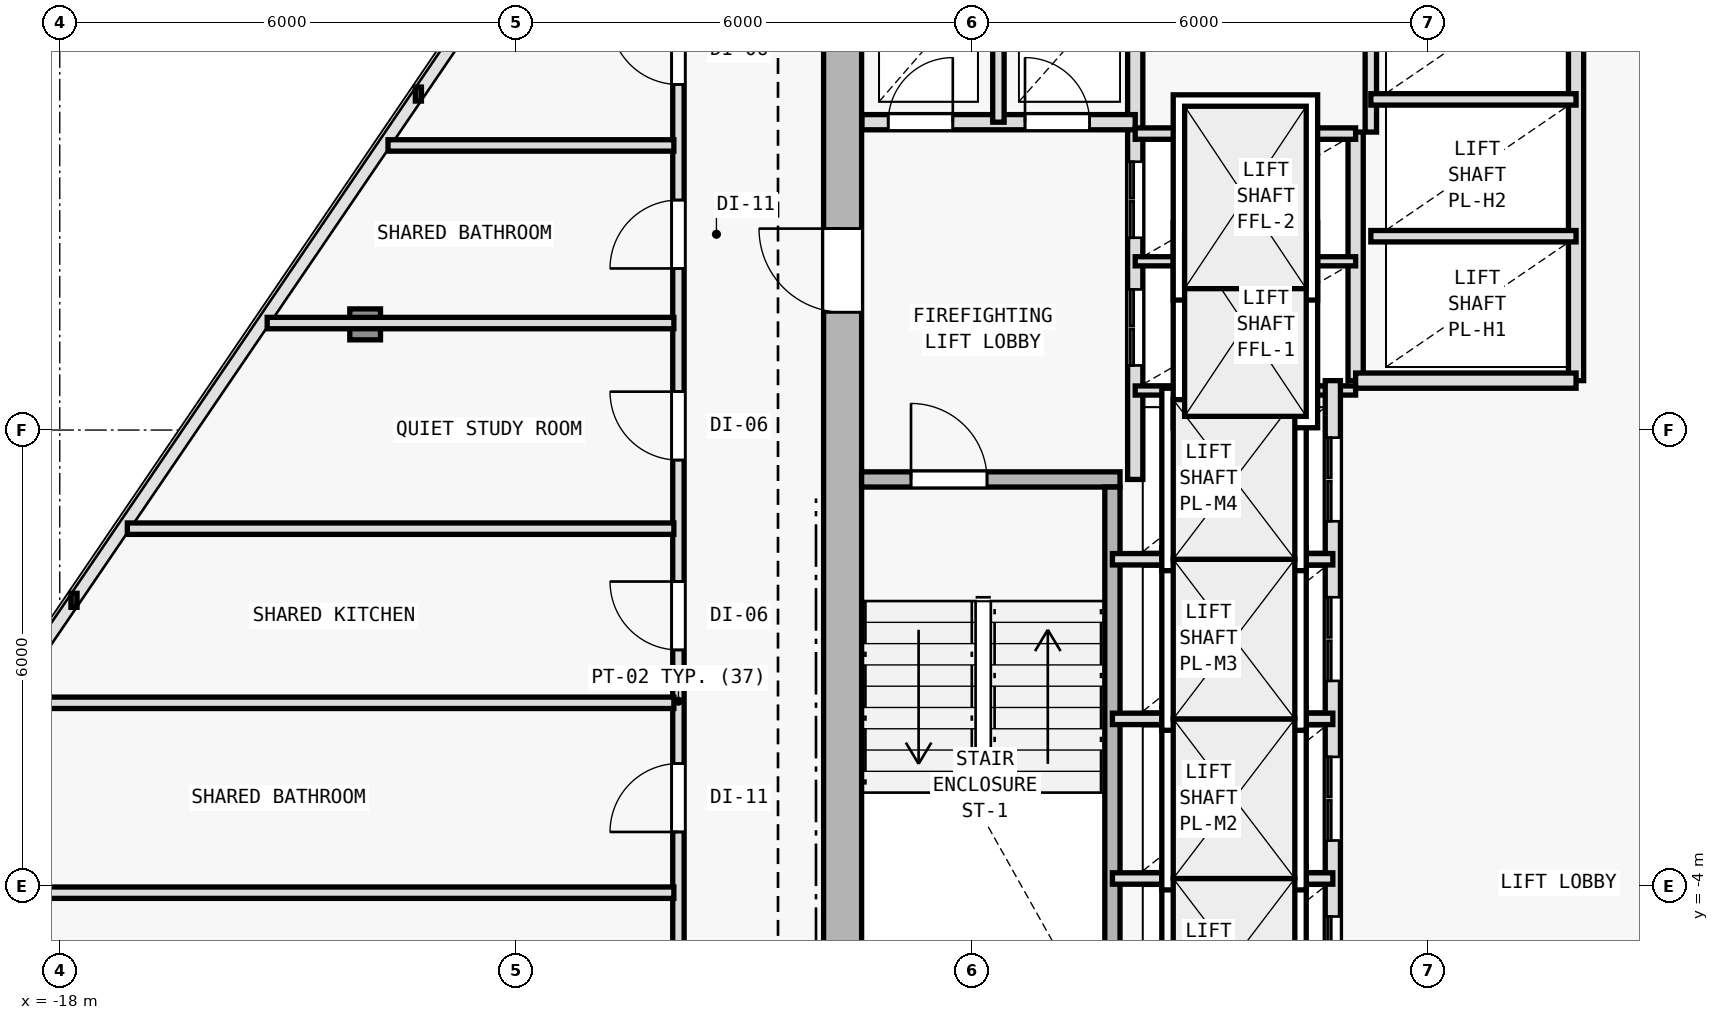
"""IFC4 building model, lengths in metres.
Left out: names, types, materials, properties, quantities, classifications, styles, units other than length and angle.
Written with IfcOpenShell. Run it as: python <this file> out.ifc"""

import sys

from ifc_helpers import new_model, si_unit, direction, frame, frame_2d, origin, origin_2d, place, context, subcontext, project, spatial, rectangle, i_section, extrude, element, fill, save


model = new_model("IFC4")
c1 = context("Model", 3, precision=1e-05, world=origin(), true_north=direction((0.0, 1.0)))
c2 = subcontext(c1, "Body", "Model", "MODEL_VIEW")
j1 = project(units=[si_unit("LENGTHUNIT", "METRE"), si_unit("PLANEANGLEUNIT", "RADIAN")], contexts=[c1])
p1 = place(None, origin())
s1 = spatial("IfcSite", under=j1, at=p1, CompositionType="ELEMENT")
p2 = place(p1, origin())
s2 = spatial("IfcBuilding", under=s1, at=p2, CompositionType="ELEMENT")
p3 = place(p2, frame((0.0, 0.0, 160.2)))
s3 = spatial("IfcBuildingStorey", under=s2, at=p3, CompositionType="ELEMENT", Elevation=160.2)
p4 = place(p3, frame((-7.7, 2.0, 0.0), z_axis=(0.0, 0.0, 1.0), x_axis=(1.0, 0.0, 0.0)))
e1 = element("IfcColumn", 1, at=p4, inside=s3, PredefinedType="COLUMN", context=c2, shape_type="SweptSolid", body=[
    extrude(i_section(OverallWidth=0.404, OverallDepth=0.407, WebThickness=0.017, FlangeThickness=0.028, FilletRadius=0.015, at=origin_2d()), origin(), (0.0, 0.0, 1.0), 3.6),
])
p5 = place(p3, frame((-13.982, 3.39, 0.006), z_axis=(0.017003561856, 0.009590008887, 0.99980943715), x_axis=(-0.491253415567, 0.871016694268, 0.0)))
e2 = element("IfcColumn", 2, at=p5, inside=s3, PredefinedType="COLUMN", context=c2, shape_type="SweptSolid", body=[
    extrude(i_section(OverallWidth=0.404, OverallDepth=0.407, WebThickness=0.017, FlangeThickness=0.028, FilletRadius=0.015, at=origin_2d()), origin(), (0.0, 0.0, 1.0), 3.59),
])
p6 = place(p3, frame((-7.7, -9.15, 0.0), z_axis=(0.0, 0.0, 1.0), x_axis=(0.0, 1.0, 0.0)))
e3 = element("IfcWall", 3, at=p6, inside=s3, PredefinedType="SHEAR", context=c2, shape_type="SweptSolid", body=[
    extrude(rectangle(XDim=19.1, YDim=0.5, at=frame_2d((9.55, 0.0))), origin(), (0.0, 0.0, 1.0), 3.35),
])
p7 = place(p6, frame((12.7, 0.0, 0.0)))
e4 = element("IfcOpeningElement", 4, at=p7, cuts=e3, PredefinedType="OPENING", context=c2, shape_type="SweptSolid", body=[
    extrude(rectangle(XDim=1.1, YDim=2.15, at=frame_2d((0.55, 1.075))), frame((0.0, 0.26, 0.0), z_axis=(0.0, -1.0, 0.0), x_axis=(1.0, 0.0, 0.0)), (0.0, 0.0, 1.0), 0.52),
])
p8 = place(p3, frame((-7.45, 1.35, 0.0), z_axis=(0.0, 0.0, 1.0), x_axis=(1.0, 0.0, 0.0)))
e5 = element("IfcWall", 5, at=p8, inside=s3, PredefinedType="SOLIDWALL", context=c2, shape_type="SweptSolid", body=[
    extrude(rectangle(XDim=3.4, YDim=0.2, at=frame_2d((1.7, 0.0))), origin(), (0.0, 0.0, 1.0), 3.35),
])
p9 = place(p8, frame((0.65, 0.0, 0.0)))
e6 = element("IfcOpeningElement", 6, at=p9, cuts=e5, PredefinedType="OPENING", context=c2, shape_type="SweptSolid", body=[
    extrude(rectangle(XDim=1.0, YDim=2.15, at=frame_2d((0.5, 1.075))), frame((0.0, 0.11, 0.0), z_axis=(0.0, -1.0, 0.0), x_axis=(1.0, 0.0, 0.0)), (0.0, 0.0, 1.0), 0.22),
])
p10 = place(p3, frame((-4.15, -5.95, 0.0), z_axis=(0.0, 0.0, 1.0), x_axis=(0.0, 1.0, 0.0)))
e7 = element("IfcWall", 7, at=p10, inside=s3, PredefinedType="SOLIDWALL", context=c2, shape_type="SweptSolid", body=[
    extrude(rectangle(XDim=7.2, YDim=0.2, at=frame_2d((3.6, 0.0))), origin(), (0.0, 0.0, 1.0), 3.35),
])
p11 = place(p3, frame((-3.85, 1.35, 0.0), z_axis=(0.0, 0.0, 1.0), x_axis=(0.0, 1.0, 0.0)))
e8 = element("IfcWall", 8, at=p11, inside=s3, PredefinedType="SOLIDWALL", context=c2, shape_type="SweptSolid", body=[
    extrude(rectangle(XDim=8.595, YDim=0.2, at=frame_2d((4.297, 0.0))), origin(), (0.0, 0.0, 1.0), 3.35),
])
p12 = place(p11, frame((1.5, 0.0, 0.0)))
e9 = element("IfcOpeningElement", 9, at=p12, cuts=e8, PredefinedType="OPENING", context=c2, shape_type="SweptSolid", body=[
    extrude(rectangle(XDim=1.0, YDim=2.15, at=frame_2d((0.5, 1.075))), frame((0.0, 0.11, 0.0), z_axis=(0.0, -1.0, 0.0), x_axis=(1.0, 0.0, 0.0)), (0.0, 0.0, 1.0), 0.22),
])
p13 = place(p11, frame((3.18, 0.0, 0.0)))
e10 = element("IfcOpeningElement", 10, at=p13, cuts=e8, PredefinedType="OPENING", context=c2, shape_type="SweptSolid", body=[
    extrude(rectangle(XDim=1.0, YDim=2.15, at=frame_2d((0.5, 1.075))), frame((0.0, 0.11, 0.0), z_axis=(0.0, -1.0, 0.0), x_axis=(1.0, 0.0, 0.0)), (0.0, 0.0, 1.0), 0.22),
])
p14 = place(p3, frame((-7.445, 6.05, 0.0), z_axis=(0.0, 0.0, 1.0), x_axis=(1.0, 0.0, 0.0)))
e11 = element("IfcWall", 11, at=p14, inside=s3, PredefinedType="SOLIDWALL", context=c2, shape_type="SweptSolid", body=[
    extrude(rectangle(XDim=3.595, YDim=0.2, at=frame_2d((1.797, 0.0))), origin(), (0.0, 0.0, 1.0), 3.35),
])
p15 = place(p14, frame((0.345, 0.0, 0.0)))
e12 = element("IfcOpeningElement", 12, at=p15, cuts=e11, PredefinedType="OPENING", context=c2, shape_type="SweptSolid", body=[
    extrude(rectangle(XDim=0.85, YDim=2.1, at=frame_2d((0.425, 1.05))), frame((0.0, 0.11, 0.0), z_axis=(0.0, -1.0, 0.0), x_axis=(1.0, 0.0, 0.0)), (0.0, 0.0, 1.0), 0.22),
])
p16 = place(p14, frame((2.145, 0.0, 0.0)))
e13 = element("IfcOpeningElement", 13, at=p16, cuts=e11, PredefinedType="OPENING", context=c2, shape_type="SweptSolid", body=[
    extrude(rectangle(XDim=0.85, YDim=2.1, at=frame_2d((0.425, 1.05))), frame((0.0, 0.11, 0.0), z_axis=(0.0, -1.0, 0.0), x_axis=(1.0, 0.0, 0.0)), (0.0, 0.0, 1.0), 0.22),
])
p17 = place(p3, frame((-5.65, 6.05, 0.0), z_axis=(0.0, 0.0, 1.0), x_axis=(0.0, 1.0, 0.0)))
e14 = element("IfcWall", 14, at=p17, inside=s3, PredefinedType="PARTITIONING", context=c2, shape_type="SweptSolid", body=[
    extrude(rectangle(XDim=2.05, YDim=0.15, at=frame_2d((1.025, 0.0))), origin(), (0.0, 0.0, 1.0), 3.35),
])
p18 = place(p3, frame((-0.95, 2.65, 0.0), z_axis=(0.0, 0.0, 1.0), x_axis=(0.0, 1.0, 0.0)))
e15 = element("IfcWall", 15, at=p18, inside=s3, PredefinedType="SOLIDWALL", context=c2, shape_type="SweptSolid", body=[
    extrude(rectangle(XDim=3.27, YDim=0.2, at=frame_2d((1.635, 0.0))), origin(), (0.0, 0.0, 1.0), 3.35),
])
for number, where, z_axis, x_axis in (
    (16, (-3.85, 2.52, 0.0), (0.0, 0.0, 1.0), (1.0, 0.0, 0.0)),
    (17, (-3.85, 4.22, 0.0), (0.0, 0.0, 1.0), (1.0, 0.0, 0.0)),
):
    element("IfcWall", number, at=place(p3, frame(where, z_axis=z_axis, x_axis=x_axis)), inside=s3, PredefinedType="PARTITIONING", context=c2, shape_type="SweptSolid", body=[
        extrude(rectangle(XDim=2.9, YDim=0.12, at=frame_2d((1.45, 0.0))), origin(), (0.0, 0.0, 1.0), 3.35),
    ])
p19 = place(p3, frame((-3.85, 5.9, 0.0), z_axis=(0.0, 0.0, 1.0), x_axis=(1.0, 0.0, 0.0)))
e18 = element("IfcWall", 18, at=p19, inside=s3, PredefinedType="PARTITIONING", context=c2, shape_type="SweptSolid", body=[
    extrude(rectangle(XDim=2.9, YDim=0.15, at=frame_2d((1.45, 0.0))), origin(), (0.0, 0.0, 1.0), 3.35),
])
p20 = place(p3, frame((-1.25, -6.05, 0.0), z_axis=(0.0, 0.0, 1.0), x_axis=(0.0, 1.0, 0.0)))
e19 = element("IfcWall", 19, at=p20, inside=s3, PredefinedType="SOLIDWALL", context=c2, shape_type="SweptSolid", body=[
    extrude(rectangle(XDim=8.7, YDim=0.2, at=frame_2d((4.35, 0.0))), origin(), (0.0, 0.0, 1.0), 3.35),
])
p21 = place(p20, frame((0.55, 0.0, 0.0)))
e20 = element("IfcOpeningElement", 20, at=p21, cuts=e19, PredefinedType="OPENING", context=c2, shape_type="SweptSolid", body=[
    extrude(rectangle(XDim=1.1, YDim=2.15, at=frame_2d((0.55, 1.075))), frame((0.0, 0.11, 0.0), z_axis=(0.0, -1.0, 0.0), x_axis=(1.0, 0.0, 0.0)), (0.0, 0.0, 1.0), 0.22),
])
p22 = place(p20, frame((2.65, 0.0, 0.0)))
e21 = element("IfcOpeningElement", 21, at=p22, cuts=e19, PredefinedType="OPENING", context=c2, shape_type="SweptSolid", body=[
    extrude(rectangle(XDim=1.1, YDim=2.15, at=frame_2d((0.55, 1.075))), frame((0.0, 0.11, 0.0), z_axis=(0.0, -1.0, 0.0), x_axis=(1.0, 0.0, 0.0)), (0.0, 0.0, 1.0), 0.22),
])
p23 = place(p20, frame((4.75, 0.0, 0.0)))
e22 = element("IfcOpeningElement", 22, at=p23, cuts=e19, PredefinedType="OPENING", context=c2, shape_type="SweptSolid", body=[
    extrude(rectangle(XDim=1.1, YDim=2.15, at=frame_2d((0.55, 1.075))), frame((0.0, 0.11, 0.0), z_axis=(0.0, -1.0, 0.0), x_axis=(1.0, 0.0, 0.0)), (0.0, 0.0, 1.0), 0.22),
])
p24 = place(p20, frame((6.85, 0.0, 0.0)))
e23 = element("IfcOpeningElement", 23, at=p24, cuts=e19, PredefinedType="OPENING", context=c2, shape_type="SweptSolid", body=[
    extrude(rectangle(XDim=1.1, YDim=2.15, at=frame_2d((0.55, 1.075))), frame((0.0, 0.11, 0.0), z_axis=(0.0, -1.0, 0.0), x_axis=(1.0, 0.0, 0.0)), (0.0, 0.0, 1.0), 0.22),
])
for number, where, z_axis, x_axis in (
    (24, (-4.15, -3.9, 0.0), (0.0, 0.0, 1.0), (1.0, 0.0, 0.0)),
    (25, (-4.15, -1.8, 0.0), (0.0, 0.0, 1.0), (1.0, 0.0, 0.0)),
    (26, (-4.15, 0.3, 0.0), (0.0, 0.0, 1.0), (1.0, 0.0, 0.0)),
):
    element("IfcWall", number, at=place(p3, frame(where, z_axis=z_axis, x_axis=x_axis)), inside=s3, PredefinedType="PARTITIONING", context=c2, shape_type="SweptSolid", body=[
        extrude(rectangle(XDim=2.9, YDim=0.15, at=frame_2d((1.45, 0.0))), origin(), (0.0, 0.0, 1.0), 3.35),
    ])
p25 = place(p3, frame((1.95, 2.65, 0.0), z_axis=(0.0, 0.0, 1.0), x_axis=(0.0, 1.0, 0.0)))
e27 = element("IfcWall", 27, at=p25, inside=s3, PredefinedType="SOLIDWALL", context=c2, shape_type="SweptSolid", body=[
    extrude(rectangle(XDim=7.295, YDim=0.2, at=frame_2d((3.647, 0.0))), origin(), (0.0, 0.0, 1.0), 3.35),
])
p26 = place(p3, frame((-0.95, 2.65, 0.0), z_axis=(0.0, 0.0, 1.0), x_axis=(1.0, 0.0, 0.0)))
e28 = element("IfcWall", 28, at=p26, inside=s3, PredefinedType="SOLIDWALL", context=c2, shape_type="SweptSolid", body=[
    extrude(rectangle(XDim=2.9, YDim=0.2, at=frame_2d((1.45, 0.0))), origin(), (0.0, 0.0, 1.0), 3.35),
])
p27 = place(p3, frame((-0.75, 5.92, 0.0), z_axis=(0.0, 0.0, 1.0), x_axis=(0.0, 1.0, 0.0)))
e29 = element("IfcWall", 29, at=p27, inside=s3, PredefinedType="PARTITIONING", context=c2, shape_type="SweptSolid", body=[
    extrude(rectangle(XDim=4.025, YDim=0.15, at=frame_2d((2.013, 0.0))), origin(), (0.0, 0.0, 1.0), 3.35),
])
for number, where, z_axis, x_axis in (
    (30, (-0.75, 4.55, 0.0), (0.0, 0.0, 1.0), (1.0, 0.0, 0.0)),
    (31, (-0.75, 6.35, 0.0), (0.0, 0.0, 1.0), (1.0, 0.0, 0.0)),
):
    element("IfcWall", number, at=place(p3, frame(where, z_axis=z_axis, x_axis=x_axis)), inside=s3, PredefinedType="PARTITIONING", context=c2, shape_type="SweptSolid", body=[
        extrude(rectangle(XDim=2.7, YDim=0.15, at=frame_2d((1.35, 0.0))), origin(), (0.0, 0.0, 1.0), 3.35),
    ])
p28 = place(p3, frame((-9.86, -11.56, 0.0), z_axis=(0.0, 0.0, 1.0), x_axis=(0.0, 1.0, 0.0)))
e32 = element("IfcWall", 32, at=p28, inside=s3, PredefinedType="PARTITIONING", context=c2, shape_type="SweptSolid", body=[
    extrude(rectangle(XDim=19.986, YDim=0.15, at=frame_2d((9.993, 0.0))), origin(), (0.0, 0.0, 1.0), 2.825),
])
p29 = place(p28, frame((10.667, 0.0, 0.0)))
e33 = element("IfcOpeningElement", 33, at=p29, cuts=e32, PredefinedType="OPENING", context=c2, shape_type="SweptSolid", body=[
    extrude(rectangle(XDim=0.9, YDim=2.1, at=frame_2d((0.45, 1.05))), frame((0.0, 0.085, 0.0), z_axis=(0.0, -1.0, 0.0), x_axis=(1.0, 0.0, 0.0)), (0.0, 0.0, 1.0), 0.17),
])
p30 = place(p28, frame((8.272, 0.0, 0.0)))
e34 = element("IfcOpeningElement", 34, at=p30, cuts=e32, PredefinedType="OPENING", context=c2, shape_type="SweptSolid", body=[
    extrude(rectangle(XDim=0.9, YDim=2.1, at=frame_2d((0.45, 1.05))), frame((0.0, 0.085, 0.0), z_axis=(0.0, -1.0, 0.0), x_axis=(1.0, 0.0, 0.0)), (0.0, 0.0, 1.0), 0.17),
])
p31 = place(p28, frame((5.54, 0.0, 0.0)))
e35 = element("IfcOpeningElement", 35, at=p31, cuts=e32, PredefinedType="OPENING", context=c2, shape_type="SweptSolid", body=[
    extrude(rectangle(XDim=0.9, YDim=2.1, at=frame_2d((0.45, 1.05))), frame((0.0, 0.085, 0.0), z_axis=(0.0, -1.0, 0.0), x_axis=(1.0, 0.0, 0.0)), (0.0, 0.0, 1.0), 0.17),
])
p32 = place(p28, frame((1.893, 0.0, 0.0)))
e36 = element("IfcOpeningElement", 36, at=p32, cuts=e32, PredefinedType="OPENING", context=c2, shape_type="SweptSolid", body=[
    extrude(rectangle(XDim=0.9, YDim=2.1, at=frame_2d((0.45, 1.05))), frame((0.0, 0.085, 0.0), z_axis=(0.0, -1.0, 0.0), x_axis=(1.0, 0.0, 0.0)), (0.0, 0.0, 1.0), 0.17),
])
p33 = place(p28, frame((18.106, 0.0, 0.0)))
e37 = element("IfcOpeningElement", 37, at=p33, cuts=e32, PredefinedType="OPENING", context=c2, shape_type="SweptSolid", body=[
    extrude(rectangle(XDim=0.9, YDim=2.1, at=frame_2d((0.45, 1.05))), frame((0.0, 0.085, 0.0), z_axis=(0.0, -1.0, 0.0), x_axis=(1.0, 0.0, 0.0)), (0.0, 0.0, 1.0), 0.17),
])
p34 = place(p28, frame((15.686, 0.0, 0.0)))
e38 = element("IfcOpeningElement", 38, at=p34, cuts=e32, PredefinedType="OPENING", context=c2, shape_type="SweptSolid", body=[
    extrude(rectangle(XDim=0.9, YDim=2.1, at=frame_2d((0.45, 1.05))), frame((0.0, 0.085, 0.0), z_axis=(0.0, -1.0, 0.0), x_axis=(1.0, 0.0, 0.0)), (0.0, 0.0, 1.0), 0.17),
])
p35 = place(p28, frame((13.165, 0.0, 0.0)))
e39 = element("IfcOpeningElement", 39, at=p35, cuts=e32, PredefinedType="OPENING", context=c2, shape_type="SweptSolid", body=[
    extrude(rectangle(XDim=0.9, YDim=2.1, at=frame_2d((0.45, 1.05))), frame((0.0, 0.085, 0.0), z_axis=(0.0, -1.0, 0.0), x_axis=(1.0, 0.0, 0.0)), (0.0, 0.0, 1.0), 0.17),
])
p36 = place(p3, frame((-9.92, 3.407, 0.0), z_axis=(0.0, 0.0, 1.0), x_axis=(-1.0, 0.0, 0.0)))
e40 = element("IfcWall", 40, at=p36, inside=s3, PredefinedType="PARTITIONING", context=c2, shape_type="SweptSolid", body=[
    extrude(rectangle(XDim=5.351, YDim=0.15, at=frame_2d((2.675, 0.0))), origin(), (0.0, 0.0, 1.0), 2.935),
])
p37 = place(p3, frame((-9.92, -1.589, 0.0), z_axis=(0.0, 0.0, 1.0), x_axis=(-1.0, 0.0, 0.0)))
e41 = element("IfcWall", 41, at=p37, inside=s3, PredefinedType="PARTITIONING", context=c2, shape_type="SweptSolid", body=[
    extrude(rectangle(XDim=8.75, YDim=0.15, at=frame_2d((4.375, 0.0))), origin(), (0.0, 0.0, 1.0), 2.935),
])
p38 = place(p3, frame((-9.92, -4.087, 0.0), z_axis=(0.0, 0.0, 1.0), x_axis=(-1.0, 0.0, 0.0)))
e42 = element("IfcWall", 42, at=p38, inside=s3, PredefinedType="PARTITIONING", context=c2, shape_type="SweptSolid", body=[
    extrude(rectangle(XDim=10.449, YDim=0.15, at=frame_2d((5.225, 0.0))), origin(), (0.0, 0.0, 1.0), 2.935),
])
p39 = place(p3, frame((-9.92, 5.744, 0.0), z_axis=(0.0, 0.0, 1.0), x_axis=(-1.0, 0.0, 0.0)))
e43 = element("IfcWall", 43, at=p39, inside=s3, PredefinedType="PARTITIONING", context=c2, shape_type="SweptSolid", body=[
    extrude(rectangle(XDim=3.761, YDim=0.15, at=frame_2d((1.88, 0.0))), origin(), (0.0, 0.0, 1.0), 2.935),
])
p40 = place(p3, frame((-9.92, 0.702, 0.0), z_axis=(0.0, 0.0, 1.0), x_axis=(-1.0, 0.0, 0.0)))
e44 = element("IfcWall", 44, at=p40, inside=s3, PredefinedType="PARTITIONING", context=c2, shape_type="SweptSolid", body=[
    extrude(rectangle(XDim=7.191, YDim=0.15, at=frame_2d((3.595, 0.0))), origin(), (0.0, 0.0, 1.0), 2.935),
])
p41 = place(p7, origin())
e45 = element("IfcDoor", 45, at=p41, inside=s3, OperationType="SINGLE_SWING_RIGHT", PredefinedType="DOOR", context=c2, shape_type="SweptSolid", body=[
    extrude(rectangle(XDim=1.1, YDim=2.15, at=frame_2d((0.55, 1.075))), frame((0.0, 0.025, 0.0), z_axis=(0.0, -1.0, 0.0), x_axis=(1.0, 0.0, 0.0)), (0.0, 0.0, 1.0), 0.05),
])
fill(e4, e45)
p42 = place(p9, origin())
e46 = element("IfcDoor", 46, at=p42, inside=s3, OperationType="SINGLE_SWING_LEFT", PredefinedType="DOOR", context=c2, shape_type="SweptSolid", body=[
    extrude(rectangle(XDim=1.0, YDim=2.15, at=frame_2d((0.5, 1.075))), frame((0.0, 0.025, 0.0), z_axis=(0.0, -1.0, 0.0), x_axis=(1.0, 0.0, 0.0)), (0.0, 0.0, 1.0), 0.05),
])
fill(e6, e46)
p43 = place(p15, origin())
e47 = element("IfcDoor", 47, at=p43, inside=s3, OperationType="SINGLE_SWING_RIGHT", PredefinedType="DOOR", context=c2, shape_type="SweptSolid", body=[
    extrude(rectangle(XDim=0.85, YDim=2.1, at=frame_2d((0.425, 1.05))), frame((0.0, 0.025, 0.0), z_axis=(0.0, -1.0, 0.0), x_axis=(1.0, 0.0, 0.0)), (0.0, 0.0, 1.0), 0.05),
])
fill(e12, e47)
p44 = place(p16, origin())
e48 = element("IfcDoor", 48, at=p44, inside=s3, OperationType="SINGLE_SWING_LEFT", PredefinedType="DOOR", context=c2, shape_type="SweptSolid", body=[
    extrude(rectangle(XDim=0.85, YDim=2.1, at=frame_2d((0.425, 1.05))), frame((0.0, 0.025, 0.0), z_axis=(0.0, -1.0, 0.0), x_axis=(1.0, 0.0, 0.0)), (0.0, 0.0, 1.0), 0.05),
])
fill(e13, e48)
p45 = place(p21, origin())
e49 = element("IfcDoor", 49, at=p45, inside=s3, OperationType="DOUBLE_DOOR_SLIDING", PredefinedType="DOOR", context=c2, shape_type="SweptSolid", body=[
    extrude(rectangle(XDim=1.1, YDim=2.15, at=frame_2d((0.55, 1.075))), frame((0.0, 0.025, 0.0), z_axis=(0.0, -1.0, 0.0), x_axis=(1.0, 0.0, 0.0)), (0.0, 0.0, 1.0), 0.05),
])
fill(e20, e49)
p46 = place(p22, origin())
e50 = element("IfcDoor", 50, at=p46, inside=s3, OperationType="DOUBLE_DOOR_SLIDING", PredefinedType="DOOR", context=c2, shape_type="SweptSolid", body=[
    extrude(rectangle(XDim=1.1, YDim=2.15, at=frame_2d((0.55, 1.075))), frame((0.0, 0.025, 0.0), z_axis=(0.0, -1.0, 0.0), x_axis=(1.0, 0.0, 0.0)), (0.0, 0.0, 1.0), 0.05),
])
fill(e21, e50)
p47 = place(p23, origin())
e51 = element("IfcDoor", 51, at=p47, inside=s3, OperationType="DOUBLE_DOOR_SLIDING", PredefinedType="DOOR", context=c2, shape_type="SweptSolid", body=[
    extrude(rectangle(XDim=1.1, YDim=2.15, at=frame_2d((0.55, 1.075))), frame((0.0, 0.025, 0.0), z_axis=(0.0, -1.0, 0.0), x_axis=(1.0, 0.0, 0.0)), (0.0, 0.0, 1.0), 0.05),
])
fill(e22, e51)
p48 = place(p24, origin())
e52 = element("IfcDoor", 52, at=p48, inside=s3, OperationType="DOUBLE_DOOR_SLIDING", PredefinedType="DOOR", context=c2, shape_type="SweptSolid", body=[
    extrude(rectangle(XDim=1.1, YDim=2.15, at=frame_2d((0.55, 1.075))), frame((0.0, 0.025, 0.0), z_axis=(0.0, -1.0, 0.0), x_axis=(1.0, 0.0, 0.0)), (0.0, 0.0, 1.0), 0.05),
])
fill(e23, e52)
p49 = place(p12, origin())
e53 = element("IfcDoor", 53, at=p49, inside=s3, OperationType="DOUBLE_DOOR_SLIDING", PredefinedType="DOOR", context=c2, shape_type="SweptSolid", body=[
    extrude(rectangle(XDim=1.0, YDim=2.15, at=frame_2d((0.5, 1.075))), frame((0.0, 0.025, 0.0), z_axis=(0.0, -1.0, 0.0), x_axis=(1.0, 0.0, 0.0)), (0.0, 0.0, 1.0), 0.05),
])
fill(e9, e53)
p50 = place(p13, origin())
e54 = element("IfcDoor", 54, at=p50, inside=s3, OperationType="DOUBLE_DOOR_SLIDING", PredefinedType="DOOR", context=c2, shape_type="SweptSolid", body=[
    extrude(rectangle(XDim=1.0, YDim=2.15, at=frame_2d((0.5, 1.075))), frame((0.0, 0.025, 0.0), z_axis=(0.0, -1.0, 0.0), x_axis=(1.0, 0.0, 0.0)), (0.0, 0.0, 1.0), 0.05),
])
fill(e10, e54)
p51 = place(p29, origin())
e55 = element("IfcDoor", 55, at=p51, inside=s3, OperationType="SINGLE_SWING_RIGHT", PredefinedType="DOOR", context=c2, shape_type="SweptSolid", body=[
    extrude(rectangle(XDim=0.9, YDim=2.1, at=frame_2d((0.45, 1.05))), frame((0.0, 0.025, 0.0), z_axis=(0.0, -1.0, 0.0), x_axis=(1.0, 0.0, 0.0)), (0.0, 0.0, 1.0), 0.05),
])
fill(e33, e55)
p52 = place(p30, origin())
e56 = element("IfcDoor", 56, at=p52, inside=s3, OperationType="SINGLE_SWING_LEFT", PredefinedType="DOOR", context=c2, shape_type="SweptSolid", body=[
    extrude(rectangle(XDim=0.9, YDim=2.1, at=frame_2d((0.45, 1.05))), frame((0.0, 0.025, 0.0), z_axis=(0.0, -1.0, 0.0), x_axis=(1.0, 0.0, 0.0)), (0.0, 0.0, 1.0), 0.05),
])
fill(e34, e56)
p53 = place(p33, origin())
e57 = element("IfcDoor", 57, at=p53, inside=s3, OperationType="SINGLE_SWING_RIGHT", PredefinedType="DOOR", context=c2, shape_type="SweptSolid", body=[
    extrude(rectangle(XDim=0.9, YDim=2.1, at=frame_2d((0.45, 1.05))), frame((0.0, 0.025, 0.0), z_axis=(0.0, -1.0, 0.0), x_axis=(1.0, 0.0, 0.0)), (0.0, 0.0, 1.0), 0.05),
])
fill(e37, e57)
p54 = place(p34, origin())
e58 = element("IfcDoor", 58, at=p54, inside=s3, OperationType="SINGLE_SWING_LEFT", PredefinedType="DOOR", context=c2, shape_type="SweptSolid", body=[
    extrude(rectangle(XDim=0.9, YDim=2.1, at=frame_2d((0.45, 1.05))), frame((0.0, 0.025, 0.0), z_axis=(0.0, -1.0, 0.0), x_axis=(1.0, 0.0, 0.0)), (0.0, 0.0, 1.0), 0.05),
])
fill(e38, e58)
p55 = place(p35, origin())
e59 = element("IfcDoor", 59, at=p55, inside=s3, OperationType="SINGLE_SWING_RIGHT", PredefinedType="DOOR", context=c2, shape_type="SweptSolid", body=[
    extrude(rectangle(XDim=0.9, YDim=2.1, at=frame_2d((0.45, 1.05))), frame((0.0, 0.025, 0.0), z_axis=(0.0, -1.0, 0.0), x_axis=(1.0, 0.0, 0.0)), (0.0, 0.0, 1.0), 0.05),
])
fill(e39, e59)
save(model, sys.argv[1])
